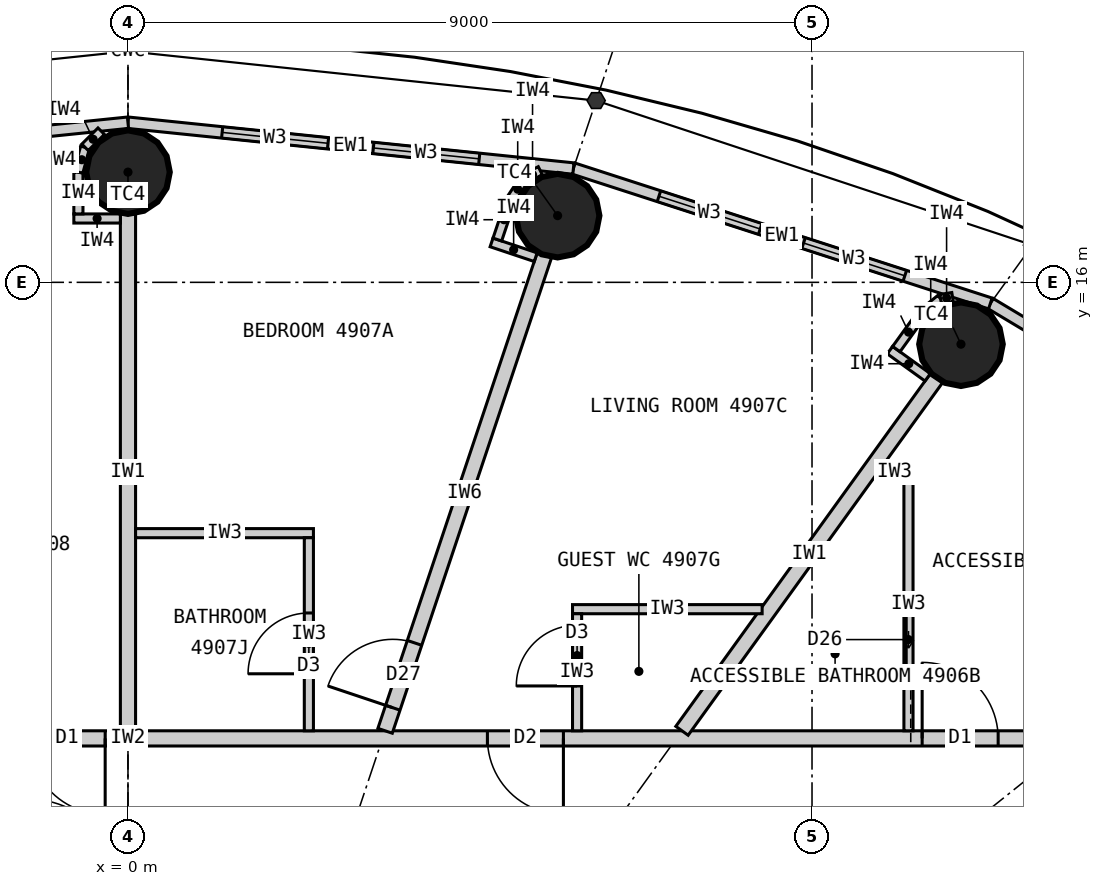
"""IFC4 building model, lengths in metres.
Left out: names, types, materials, properties, quantities, classifications, styles, units other than length and angle.
Written with IfcOpenShell. Run it as: python <this file> out.ifc"""

import sys

from ifc_helpers import new_model, si_unit, direction, frame, frame_2d, origin, origin_2d, place, context, subcontext, project, spatial, rectangle, circle, extrude, clip, halfspace, element, fill, save


model = new_model("IFC4")
c1 = context("Model", 3, precision=1e-05, world=origin(), true_north=direction((0.0, 1.0)))
c2 = subcontext(c1, "Body", "Model", "MODEL_VIEW")
j1 = project(units=[si_unit("LENGTHUNIT", "METRE"), si_unit("PLANEANGLEUNIT", "RADIAN")], contexts=[c1])
p1 = place(None, origin())
s1 = spatial("IfcSite", under=j1, at=p1, CompositionType="ELEMENT")
p2 = place(p1, origin())
s2 = spatial("IfcBuilding", under=s1, at=p2, CompositionType="ELEMENT")
p3 = place(p2, frame((0.0, 0.0, 183.0)))
s3 = spatial("IfcBuildingStorey", under=s2, at=p3, CompositionType="ELEMENT", Elevation=183.0)
for number, where, z_axis, x_axis in (
    (1, (10.96, 15.186, 0.0), (0.0, 0.0, 1.0), (1.0, 0.0, 0.0)),
    (2, (5.653, 16.877, 0.0), (0.0, 0.0, 1.0), (1.0, 0.0, 0.0)),
    (3, (0.0, 17.45, 0.0), (0.0, 0.0, 1.0), (1.0, 0.0, 0.0)),
):
    element("IfcColumn", number, at=place(p3, frame(where, z_axis=z_axis, x_axis=x_axis)), inside=s3, PredefinedType="COLUMN", context=c2, shape_type="Clipping", body=[
        clip(extrude(circle(Radius=0.55, at=origin_2d()), origin(), (0.0, 0.0, 1.0), 3.3), halfspace(frame((0.0, 0.0, 2.25), z_axis=(0.0, 0.0, 1.0), x_axis=(1.0, 0.0, 0.0)), False)),
    ])
p4 = place(p3, frame((16.095, 12.876, 0.0), z_axis=(0.0, 0.0, 1.0), x_axis=(-0.857695199231, 0.514158482587, 0.0)))
e4 = element("IfcWall", 4, at=p4, inside=s3, PredefinedType="ELEMENTEDWALL", context=c2, shape_type="SweptSolid", body=[
    extrude(rectangle(XDim=5.536, YDim=0.15, at=frame_2d((2.768, 0.0))), origin(), (0.0, 0.0, 1.0), 3.05),
])
p5 = place(p4, frame((1.068, 0.0, 0.9)))
e5 = element("IfcOpeningElement", 5, at=p5, cuts=e4, PredefinedType="OPENING", context=c2, shape_type="SweptSolid", body=[
    extrude(rectangle(XDim=1.4, YDim=1.9, at=frame_2d((0.7, 0.95))), frame((0.0, 0.085, 0.0), z_axis=(0.0, -1.0, 0.0), x_axis=(1.0, 0.0, 0.0)), (0.0, 0.0, 1.0), 0.17),
])
p6 = place(p4, frame((3.068, 0.0, 0.9)))
e6 = element("IfcOpeningElement", 6, at=p6, cuts=e4, PredefinedType="OPENING", context=c2, shape_type="SweptSolid", body=[
    extrude(rectangle(XDim=1.4, YDim=1.9, at=frame_2d((0.7, 0.95))), frame((0.0, 0.085, 0.0), z_axis=(0.0, -1.0, 0.0), x_axis=(1.0, 0.0, 0.0)), (0.0, 0.0, 1.0), 0.17),
])
p7 = place(p3, frame((11.346, 15.722, 0.0), z_axis=(0.0, 0.0, 1.0), x_axis=(-0.951432482129, 0.307857486429, 0.0)))
e7 = element("IfcWall", 7, at=p7, inside=s3, PredefinedType="ELEMENTEDWALL", context=c2, shape_type="SweptSolid", body=[
    extrude(rectangle(XDim=5.766, YDim=0.15, at=frame_2d((2.883, 0.0))), origin(), (0.0, 0.0, 1.0), 3.05),
])
p8 = place(p7, frame((1.183, 0.0, 0.9)))
e8 = element("IfcOpeningElement", 8, at=p8, cuts=e7, PredefinedType="OPENING", context=c2, shape_type="SweptSolid", body=[
    extrude(rectangle(XDim=1.4, YDim=1.9, at=frame_2d((0.7, 0.95))), frame((0.0, 0.085, 0.0), z_axis=(0.0, -1.0, 0.0), x_axis=(1.0, 0.0, 0.0)), (0.0, 0.0, 1.0), 0.17),
])
p9 = place(p7, frame((3.183, 0.0, 0.9)))
e9 = element("IfcOpeningElement", 9, at=p9, cuts=e7, PredefinedType="OPENING", context=c2, shape_type="SweptSolid", body=[
    extrude(rectangle(XDim=1.4, YDim=1.9, at=frame_2d((0.7, 0.95))), frame((0.0, 0.085, 0.0), z_axis=(0.0, -1.0, 0.0), x_axis=(1.0, 0.0, 0.0)), (0.0, 0.0, 1.0), 0.17),
])
p10 = place(p3, frame((5.86, 17.497, 0.0), z_axis=(0.0, 0.0, 1.0), x_axis=(-0.994751738032, 0.102318032045, 0.0)))
e10 = element("IfcWall", 10, at=p10, inside=s3, PredefinedType="ELEMENTEDWALL", context=c2, shape_type="SweptSolid", body=[
    extrude(rectangle(XDim=5.891, YDim=0.15, at=frame_2d((2.946, 0.0))), origin(), (0.0, 0.0, 1.0), 3.05),
])
p11 = place(p10, frame((1.246, 0.0, 0.9)))
e11 = element("IfcOpeningElement", 11, at=p11, cuts=e10, PredefinedType="OPENING", context=c2, shape_type="SweptSolid", body=[
    extrude(rectangle(XDim=1.4, YDim=1.9, at=frame_2d((0.7, 0.95))), frame((0.0, 0.085, 0.0), z_axis=(0.0, -1.0, 0.0), x_axis=(1.0, 0.0, 0.0)), (0.0, 0.0, 1.0), 0.17),
])
p12 = place(p10, frame((3.246, 0.0, 0.9)))
e12 = element("IfcOpeningElement", 12, at=p12, cuts=e10, PredefinedType="OPENING", context=c2, shape_type="SweptSolid", body=[
    extrude(rectangle(XDim=1.4, YDim=1.9, at=frame_2d((0.7, 0.95))), frame((0.0, 0.085, 0.0), z_axis=(0.0, -1.0, 0.0), x_axis=(1.0, 0.0, 0.0)), (0.0, 0.0, 1.0), 0.17),
])
p13 = place(p3, frame((0.0, 18.1, 0.0), z_axis=(0.0, 0.0, 1.0), x_axis=(-0.994751738032, -0.102318032045, 0.0)))
e13 = element("IfcWall", 13, at=p13, inside=s3, PredefinedType="ELEMENTEDWALL", context=c2, shape_type="SweptSolid", body=[
    extrude(rectangle(XDim=5.891, YDim=0.15, at=frame_2d((2.946, 0.0))), origin(), (0.0, 0.0, 1.0), 3.05),
])
p14 = place(p13, frame((1.246, 0.0, 0.9)))
e14 = element("IfcOpeningElement", 14, at=p14, cuts=e13, PredefinedType="OPENING", context=c2, shape_type="SweptSolid", body=[
    extrude(rectangle(XDim=1.4, YDim=1.9, at=frame_2d((0.7, 0.95))), frame((0.0, 0.085, 0.0), z_axis=(0.0, -1.0, 0.0), x_axis=(1.0, 0.0, 0.0)), (0.0, 0.0, 1.0), 0.17),
])
p15 = place(p13, frame((3.246, 0.0, 0.9)))
e15 = element("IfcOpeningElement", 15, at=p15, cuts=e13, PredefinedType="OPENING", context=c2, shape_type="SweptSolid", body=[
    extrude(rectangle(XDim=1.4, YDim=1.9, at=frame_2d((0.7, 0.95))), frame((0.0, 0.085, 0.0), z_axis=(0.0, -1.0, 0.0), x_axis=(1.0, 0.0, 0.0)), (0.0, 0.0, 1.0), 0.17),
])
p16 = place(p3, frame((-14.1, 10.0, 0.0), z_axis=(0.0, 0.0, 1.0), x_axis=(1.0, 0.0, 0.0)))
e16 = element("IfcWall", 16, at=p16, inside=s3, PredefinedType="PARTITIONING", context=c2, shape_type="SweptSolid", body=[
    extrude(rectangle(XDim=28.2, YDim=0.2, at=frame_2d((14.1, 0.0))), origin(), (0.0, 0.0, 1.0), 3.05),
])
p17 = place(p16, frame((24.549, 0.0, 0.0)))
e17 = element("IfcOpeningElement", 17, at=p17, cuts=e16, PredefinedType="OPENING", context=c2, shape_type="SweptSolid", body=[
    extrude(rectangle(XDim=1.0, YDim=2.2, at=frame_2d((0.5, 1.1))), frame((0.0, 0.11, 0.0), z_axis=(0.0, -1.0, 0.0), x_axis=(1.0, 0.0, 0.0)), (0.0, 0.0, 1.0), 0.22),
])
p18 = place(p16, frame((18.829, 0.0, 0.0)))
e18 = element("IfcOpeningElement", 18, at=p18, cuts=e16, PredefinedType="OPENING", context=c2, shape_type="SweptSolid", body=[
    extrude(rectangle(XDim=1.0, YDim=2.2, at=frame_2d((0.5, 1.1))), frame((0.0, 0.11, 0.0), z_axis=(0.0, -1.0, 0.0), x_axis=(1.0, 0.0, 0.0)), (0.0, 0.0, 1.0), 0.22),
])
p19 = place(p16, frame((12.8, 0.0, 0.0)))
e19 = element("IfcOpeningElement", 19, at=p19, cuts=e16, PredefinedType="OPENING", context=c2, shape_type="SweptSolid", body=[
    extrude(rectangle(XDim=1.0, YDim=2.2, at=frame_2d((0.5, 1.1))), frame((0.0, 0.11, 0.0), z_axis=(0.0, -1.0, 0.0), x_axis=(1.0, 0.0, 0.0)), (0.0, 0.0, 1.0), 0.22),
])
p20 = place(p16, frame((5.25, 0.0, 0.0)))
e20 = element("IfcOpeningElement", 20, at=p20, cuts=e16, PredefinedType="OPENING", context=c2, shape_type="SweptSolid", body=[
    extrude(rectangle(XDim=1.0, YDim=2.2, at=frame_2d((0.5, 1.1))), frame((0.0, 0.11, 0.0), z_axis=(0.0, -1.0, 0.0), x_axis=(1.0, 0.0, 0.0)), (0.0, 0.0, 1.0), 0.22),
])
p21 = place(p3, frame((7.289, 10.1, 0.0), z_axis=(0.0, 0.0, 1.0), x_axis=(0.585222595178, 0.810872686735, 0.0)))
e21 = element("IfcWall", 21, at=p21, inside=s3, PredefinedType="PARTITIONING", context=c2, shape_type="SweptSolid", body=[
    extrude(rectangle(XDim=5.722, YDim=0.2, at=frame_2d((2.861, 0.0))), origin(), (0.0, 0.0, 1.0), 2.15),
])
p22 = place(p3, frame((3.383, 10.1, 0.0), z_axis=(0.0, 0.0, 1.0), x_axis=(0.317615120474, 0.948219718866, 0.0)))
e22 = element("IfcWall", 22, at=p22, inside=s3, PredefinedType="PARTITIONING", context=c2, shape_type="SweptSolid", body=[
    extrude(rectangle(XDim=6.597, YDim=0.2, at=frame_2d((3.299, 0.0))), origin(), (0.0, 0.0, 1.0), 2.15),
])
p23 = place(p22, frame((0.32, 0.0, 0.0)))
e23 = element("IfcOpeningElement", 23, at=p23, cuts=e22, PredefinedType="OPENING", context=c2, shape_type="SweptSolid", body=[
    extrude(rectangle(XDim=0.9, YDim=2.1, at=frame_2d((0.45, 1.05))), frame((0.0, 0.11, 0.0), z_axis=(0.0, -1.0, 0.0), x_axis=(1.0, 0.0, 0.0)), (0.0, 0.0, 1.0), 0.22),
])
p24 = place(p3, frame((0.0, 10.1, 0.0), z_axis=(0.0, 0.0, 1.0), x_axis=(0.0, 1.0, 0.0)))
e24 = element("IfcWall", 24, at=p24, inside=s3, PredefinedType="PARTITIONING", context=c2, shape_type="SweptSolid", body=[
    extrude(rectangle(XDim=6.8, YDim=0.2, at=frame_2d((3.4, 0.0))), origin(), (0.0, 0.0, 1.0), 2.25),
])
p25 = place(p3, frame((9.843, 13.5, 0.0), z_axis=(0.0, 0.0, 1.0), x_axis=(1.0, 0.0, 0.0)))
e25 = element("IfcWall", 25, at=p25, inside=s3, PredefinedType="PARTITIONING", context=c2, shape_type="SweptSolid", body=[
    extrude(rectangle(XDim=0.486, YDim=0.12, at=frame_2d((0.243, 0.0))), origin(), (0.0, 0.0, 1.0), 3.05),
])
p26 = place(p3, frame((10.269, 10.1, 0.0), z_axis=(0.0, 0.0, 1.0), x_axis=(0.0, 1.0, 0.0)))
e26 = element("IfcWall", 26, at=p26, inside=s3, PredefinedType="PARTITIONING", context=c2, shape_type="SweptSolid", body=[
    extrude(rectangle(XDim=3.34, YDim=0.12, at=frame_2d((1.67, 0.0))), origin(), (0.0, 0.0, 1.0), 3.05),
])
p27 = place(p26, frame((0.75, 0.0, 0.0)))
e27 = element("IfcOpeningElement", 27, at=p27, cuts=e26, PredefinedType="OPENING", context=c2, shape_type="SweptSolid", body=[
    extrude(rectangle(XDim=0.9, YDim=2.1, at=frame_2d((0.45, 1.05))), frame((0.0, 0.07, 0.0), z_axis=(0.0, -1.0, 0.0), x_axis=(1.0, 0.0, 0.0)), (0.0, 0.0, 1.0), 0.14),
])
p28 = place(p3, frame((8.344, 11.7, 0.0), z_axis=(0.0, 0.0, 1.0), x_axis=(-1.0, 0.0, 0.0)))
e28 = element("IfcWall", 28, at=p28, inside=s3, PredefinedType="PARTITIONING", context=c2, shape_type="SweptSolid", body=[
    extrude(rectangle(XDim=2.495, YDim=0.12, at=frame_2d((1.247, 0.0))), origin(), (0.0, 0.0, 1.0), 3.05),
])
p29 = place(p3, frame((5.909, 10.1, 0.0), z_axis=(0.0, 0.0, 1.0), x_axis=(0.0, 1.0, 0.0)))
e29 = element("IfcWall", 29, at=p29, inside=s3, PredefinedType="PARTITIONING", context=c2, shape_type="SweptSolid", body=[
    extrude(rectangle(XDim=1.54, YDim=0.12, at=frame_2d((0.77, 0.0))), origin(), (0.0, 0.0, 1.0), 3.05),
])
p30 = place(p29, frame((0.59, 0.0, 0.0)))
e30 = element("IfcOpeningElement", 30, at=p30, cuts=e29, PredefinedType="OPENING", context=c2, shape_type="SweptSolid", body=[
    extrude(rectangle(XDim=0.8, YDim=2.1, at=frame_2d((0.4, 1.05))), frame((0.0, 0.07, 0.0), z_axis=(0.0, -1.0, 0.0), x_axis=(1.0, 0.0, 0.0)), (0.0, 0.0, 1.0), 0.14),
])
p31 = place(p3, frame((0.1, 12.7, 0.0), z_axis=(0.0, 0.0, 1.0), x_axis=(1.0, 0.0, 0.0)))
e31 = element("IfcWall", 31, at=p31, inside=s3, PredefinedType="PARTITIONING", context=c2, shape_type="SweptSolid", body=[
    extrude(rectangle(XDim=2.34, YDim=0.12, at=frame_2d((1.17, 0.0))), origin(), (0.0, 0.0, 1.0), 3.05),
])
p32 = place(p3, frame((2.38, 10.1, 0.0), z_axis=(0.0, 0.0, 1.0), x_axis=(0.0, 1.0, 0.0)))
e32 = element("IfcWall", 32, at=p32, inside=s3, PredefinedType="PARTITIONING", context=c2, shape_type="SweptSolid", body=[
    extrude(rectangle(XDim=2.54, YDim=0.12, at=frame_2d((1.27, 0.0))), origin(), (0.0, 0.0, 1.0), 3.05),
])
p33 = place(p32, frame((0.75, 0.0, 0.0)))
e33 = element("IfcOpeningElement", 33, at=p33, cuts=e32, PredefinedType="OPENING", context=c2, shape_type="SweptSolid", body=[
    extrude(rectangle(XDim=0.8, YDim=2.1, at=frame_2d((0.4, 1.05))), frame((0.0, 0.07, 0.0), z_axis=(0.0, -1.0, 0.0), x_axis=(1.0, 0.0, 0.0)), (0.0, 0.0, 1.0), 0.14),
])
p34 = place(p3, frame((10.522, 14.75, 0.0), z_axis=(0.0, 0.0, 1.0), x_axis=(-0.811057588427, 0.584966313777, 0.0)))
e34 = element("IfcWall", 34, at=p34, inside=s3, PredefinedType="PARTITIONING", context=c2, shape_type="SweptSolid", body=[
    extrude(rectangle(XDim=0.612, YDim=0.12, at=frame_2d((0.306, 0.0))), origin(), (0.0, 0.0, 1.0), 3.05),
])
p35 = place(p3, frame((10.109, 15.122, 0.0), z_axis=(0.0, 0.0, 1.0), x_axis=(0.585344718358, 0.810784534072, 0.0)))
e35 = element("IfcWall", 35, at=p35, inside=s3, PredefinedType="PARTITIONING", context=c2, shape_type="SweptSolid", body=[
    extrude(rectangle(XDim=0.55, YDim=0.12, at=frame_2d((0.275, 0.0))), origin(), (0.0, 0.0, 1.0), 3.05),
])
p36 = place(p3, frame((10.431, 15.568, 0.0), z_axis=(0.0, 0.0, 1.0), x_axis=(0.77505137267, 0.631898227345, 0.0)))
e36 = element("IfcWall", 36, at=p36, inside=s3, PredefinedType="PARTITIONING", context=c2, shape_type="SweptSolid", body=[
    extrude(rectangle(XDim=0.338, YDim=0.12, at=frame_2d((0.169, 0.0))), origin(), (0.0, 0.0, 1.0), 3.05),
])
p37 = place(p3, frame((10.693, 15.781, 0.0), z_axis=(0.0, 0.0, 1.0), x_axis=(0.987256785332, 0.159135287777, 0.0)))
e37 = element("IfcWall", 37, at=p37, inside=s3, PredefinedType="PARTITIONING", context=c2, shape_type="SweptSolid", body=[
    extrude(rectangle(XDim=0.158, YDim=0.12, at=frame_2d((0.079, 0.0))), origin(), (0.0, 0.0, 1.0), 3.05),
])
p38 = place(p3, frame((5.364, 16.331, 0.0), z_axis=(0.0, 0.0, 1.0), x_axis=(-0.948283770087, 0.317423835572, 0.0)))
e38 = element("IfcWall", 38, at=p38, inside=s3, PredefinedType="PARTITIONING", context=c2, shape_type="SweptSolid", body=[
    extrude(rectangle(XDim=0.612, YDim=0.12, at=frame_2d((0.306, 0.0))), origin(), (0.0, 0.0, 1.0), 3.05),
])
p39 = place(p3, frame((4.86, 16.563, 0.0), z_axis=(0.0, 0.0, 1.0), x_axis=(0.317825321803, 0.948149284038, 0.0)))
e39 = element("IfcWall", 39, at=p39, inside=s3, PredefinedType="PARTITIONING", context=c2, shape_type="SweptSolid", body=[
    extrude(rectangle(XDim=0.55, YDim=0.12, at=frame_2d((0.275, 0.0))), origin(), (0.0, 0.0, 1.0), 3.05),
])
p40 = place(p3, frame((5.034, 17.084, 0.0), z_axis=(0.0, 0.0, 1.0), x_axis=(0.552362205726, 0.833604218851, 0.0)))
e40 = element("IfcWall", 40, at=p40, inside=s3, PredefinedType="PARTITIONING", context=c2, shape_type="SweptSolid", body=[
    extrude(rectangle(XDim=0.338, YDim=0.12, at=frame_2d((0.169, 0.0))), origin(), (0.0, 0.0, 1.0), 3.05),
])
p41 = place(p3, frame((5.221, 17.366, 0.0), z_axis=(0.0, 0.0, 1.0), x_axis=(0.895067896179, 0.445929883759, 0.0)))
e41 = element("IfcWall", 41, at=p41, inside=s3, PredefinedType="PARTITIONING", context=c2, shape_type="SweptSolid", body=[
    extrude(rectangle(XDim=0.228, YDim=0.12, at=frame_2d((0.114, 0.0))), origin(), (0.0, 0.0, 1.0), 3.05),
])
p42 = place(p3, frame((-0.1, 16.84, 0.0), z_axis=(0.0, 0.0, 1.0), x_axis=(-1.0, 0.0, 0.0)))
e42 = element("IfcWall", 42, at=p42, inside=s3, PredefinedType="PARTITIONING", context=c2, shape_type="SweptSolid", body=[
    extrude(rectangle(XDim=0.612, YDim=0.12, at=frame_2d((0.306, 0.0))), origin(), (0.0, 0.0, 1.0), 3.05),
])
p43 = place(p3, frame((-0.652, 16.9, 0.0), z_axis=(0.0, 0.0, 1.0), x_axis=(0.0, 1.0, 0.0)))
e43 = element("IfcWall", 43, at=p43, inside=s3, PredefinedType="PARTITIONING", context=c2, shape_type="SweptSolid", body=[
    extrude(rectangle(XDim=0.55, YDim=0.12, at=frame_2d((0.275, 0.0))), origin(), (0.0, 0.0, 1.0), 3.05),
])
p44 = place(p3, frame((-0.652, 17.45, 0.0), z_axis=(0.0, 0.0, 1.0), x_axis=(0.258832454679, 0.965922233104, 0.0)))
e44 = element("IfcWall", 44, at=p44, inside=s3, PredefinedType="PARTITIONING", context=c2, shape_type="SweptSolid", body=[
    extrude(rectangle(XDim=0.338, YDim=0.12, at=frame_2d((0.169, 0.0))), origin(), (0.0, 0.0, 1.0), 3.05),
])
p45 = place(p3, frame((-0.565, 17.776, 0.0), z_axis=(0.0, 0.0, 1.0), x_axis=(0.707106781187, 0.707106781187, 0.0)))
e45 = element("IfcWall", 45, at=p45, inside=s3, PredefinedType="PARTITIONING", context=c2, shape_type="SweptSolid", body=[
    extrude(rectangle(XDim=0.301, YDim=0.12, at=frame_2d((0.15, 0.0))), origin(), (0.0, 0.0, 1.0), 3.05),
])
p46 = place(p8, origin())
e46 = element("IfcWindow", 46, at=p46, inside=s3, PartitioningType="SINGLE_PANEL", PredefinedType="WINDOW", context=c2, shape_type="SweptSolid", body=[
    extrude(rectangle(XDim=1.4, YDim=1.9, at=frame_2d((0.7, 0.95))), frame((0.0, 0.03, 0.0), z_axis=(0.0, -1.0, 0.0), x_axis=(1.0, 0.0, 0.0)), (0.0, 0.0, 1.0), 0.06),
])
fill(e8, e46)
p47 = place(p9, origin())
e47 = element("IfcWindow", 47, at=p47, inside=s3, PartitioningType="SINGLE_PANEL", PredefinedType="WINDOW", context=c2, shape_type="SweptSolid", body=[
    extrude(rectangle(XDim=1.4, YDim=1.9, at=frame_2d((0.7, 0.95))), frame((0.0, 0.03, 0.0), z_axis=(0.0, -1.0, 0.0), x_axis=(1.0, 0.0, 0.0)), (0.0, 0.0, 1.0), 0.06),
])
fill(e9, e47)
p48 = place(p11, origin())
e48 = element("IfcWindow", 48, at=p48, inside=s3, PartitioningType="SINGLE_PANEL", PredefinedType="WINDOW", context=c2, shape_type="SweptSolid", body=[
    extrude(rectangle(XDim=1.4, YDim=1.9, at=frame_2d((0.7, 0.95))), frame((0.0, 0.03, 0.0), z_axis=(0.0, -1.0, 0.0), x_axis=(1.0, 0.0, 0.0)), (0.0, 0.0, 1.0), 0.06),
])
fill(e11, e48)
p49 = place(p12, origin())
e49 = element("IfcWindow", 49, at=p49, inside=s3, PartitioningType="SINGLE_PANEL", PredefinedType="WINDOW", context=c2, shape_type="SweptSolid", body=[
    extrude(rectangle(XDim=1.4, YDim=1.9, at=frame_2d((0.7, 0.95))), frame((0.0, 0.03, 0.0), z_axis=(0.0, -1.0, 0.0), x_axis=(1.0, 0.0, 0.0)), (0.0, 0.0, 1.0), 0.06),
])
fill(e12, e49)
p50 = place(p27, origin())
e50 = element("IfcDoor", 50, at=p50, inside=s3, OperationType="SLIDING_TO_LEFT", PredefinedType="DOOR", context=c2, shape_type="SweptSolid", body=[
    extrude(rectangle(XDim=0.9, YDim=2.1, at=frame_2d((0.45, 1.05))), frame((0.0, 0.025, 0.0), z_axis=(0.0, -1.0, 0.0), x_axis=(1.0, 0.0, 0.0)), (0.0, 0.0, 1.0), 0.05),
])
fill(e27, e50)
p51 = place(p17, origin())
e51 = element("IfcDoor", 51, at=p51, inside=s3, OperationType="SINGLE_SWING_LEFT", PredefinedType="DOOR", context=c2, shape_type="SweptSolid", body=[
    extrude(rectangle(XDim=1.0, YDim=2.2, at=frame_2d((0.5, 1.1))), frame((0.0, 0.025, 0.0), z_axis=(0.0, -1.0, 0.0), x_axis=(1.0, 0.0, 0.0)), (0.0, 0.0, 1.0), 0.05),
])
fill(e17, e51)
p52 = place(p30, origin())
e52 = element("IfcDoor", 52, at=p52, inside=s3, OperationType="SINGLE_SWING_LEFT", PredefinedType="DOOR", context=c2, shape_type="SweptSolid", body=[
    extrude(rectangle(XDim=0.8, YDim=2.1, at=frame_2d((0.4, 1.05))), frame((0.0, 0.025, 0.0), z_axis=(0.0, -1.0, 0.0), x_axis=(1.0, 0.0, 0.0)), (0.0, 0.0, 1.0), 0.05),
])
fill(e30, e52)
p53 = place(p18, origin())
e53 = element("IfcDoor", 53, at=p53, inside=s3, OperationType="SINGLE_SWING_RIGHT", PredefinedType="DOOR", context=c2, shape_type="SweptSolid", body=[
    extrude(rectangle(XDim=1.0, YDim=2.2, at=frame_2d((0.5, 1.1))), frame((0.0, 0.025, 0.0), z_axis=(0.0, -1.0, 0.0), x_axis=(1.0, 0.0, 0.0)), (0.0, 0.0, 1.0), 0.05),
])
fill(e18, e53)
p54 = place(p33, origin())
e54 = element("IfcDoor", 54, at=p54, inside=s3, OperationType="SINGLE_SWING_LEFT", PredefinedType="DOOR", context=c2, shape_type="SweptSolid", body=[
    extrude(rectangle(XDim=0.8, YDim=2.1, at=frame_2d((0.4, 1.05))), frame((0.0, 0.025, 0.0), z_axis=(0.0, -1.0, 0.0), x_axis=(1.0, 0.0, 0.0)), (0.0, 0.0, 1.0), 0.05),
])
fill(e33, e54)
p55 = place(p23, origin())
e55 = element("IfcDoor", 55, at=p55, inside=s3, OperationType="SINGLE_SWING_LEFT", PredefinedType="DOOR", context=c2, shape_type="SweptSolid", body=[
    extrude(rectangle(XDim=0.9, YDim=2.1, at=frame_2d((0.45, 1.05))), frame((0.0, 0.025, 0.0), z_axis=(0.0, -1.0, 0.0), x_axis=(1.0, 0.0, 0.0)), (0.0, 0.0, 1.0), 0.05),
])
fill(e23, e55)
p56 = place(p19, origin())
e56 = element("IfcDoor", 56, at=p56, inside=s3, OperationType="SINGLE_SWING_RIGHT", PredefinedType="DOOR", context=c2, shape_type="SweptSolid", body=[
    extrude(rectangle(XDim=1.0, YDim=2.2, at=frame_2d((0.5, 1.1))), frame((0.0, 0.025, 0.0), z_axis=(0.0, -1.0, 0.0), x_axis=(1.0, 0.0, 0.0)), (0.0, 0.0, 1.0), 0.05),
])
fill(e19, e56)
save(model, sys.argv[1])
